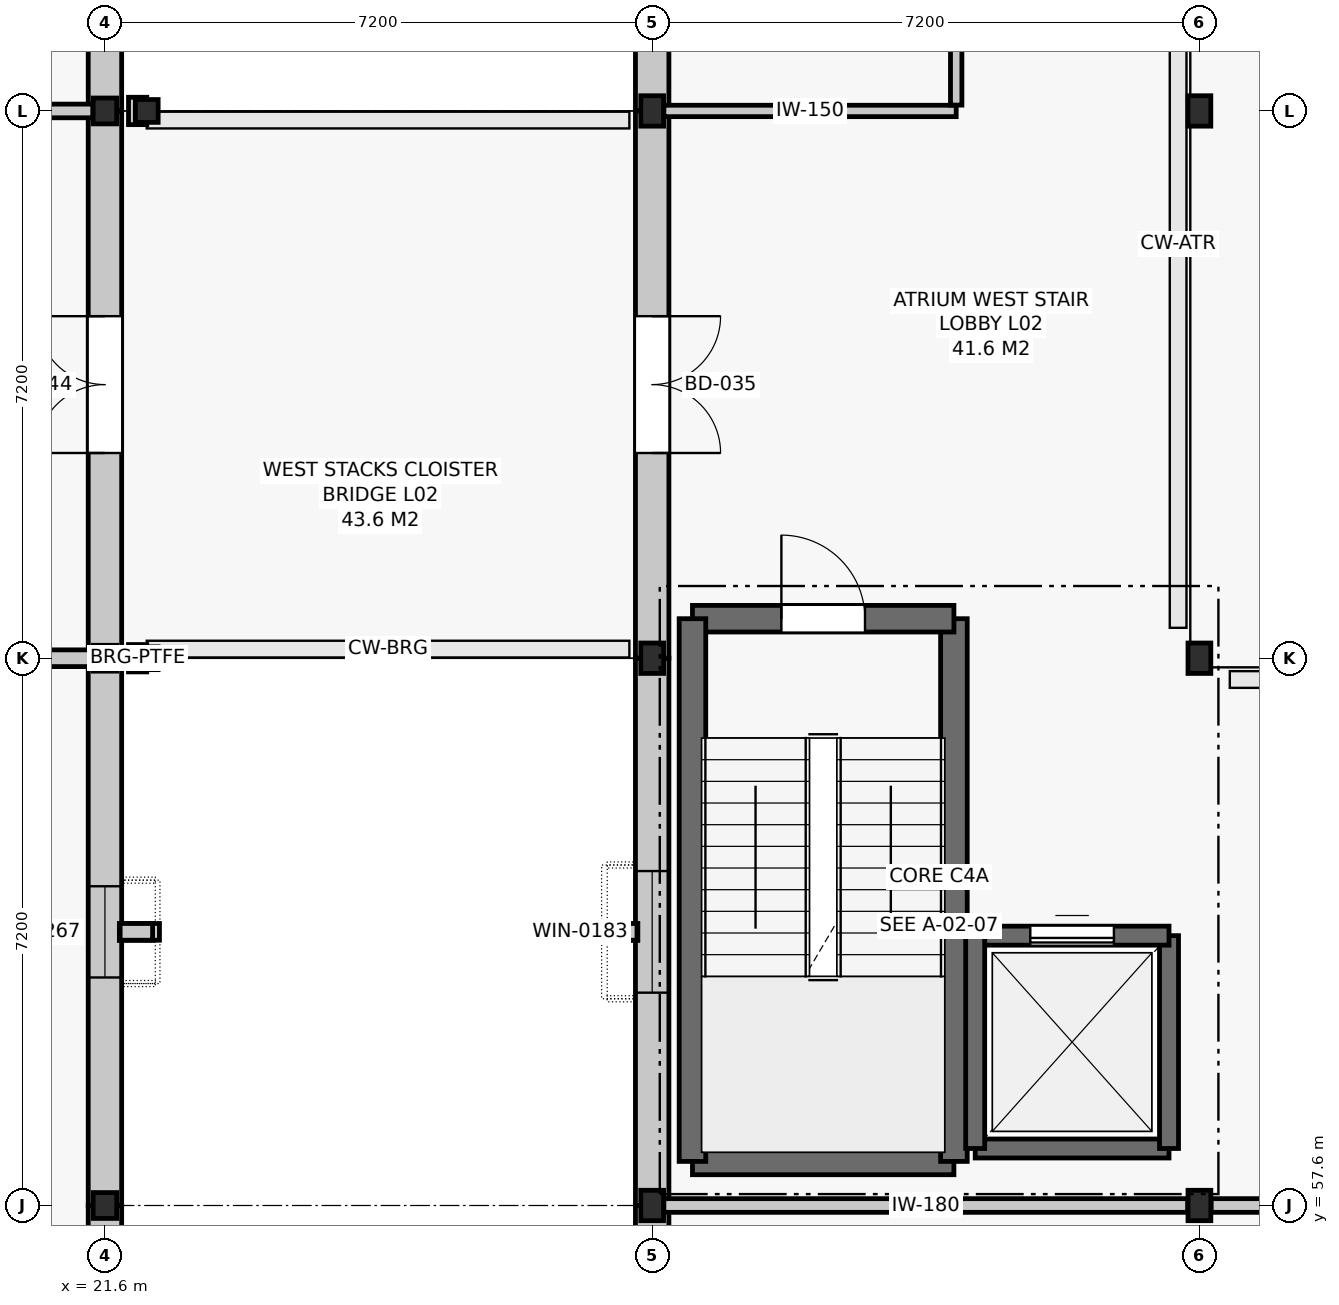
"""IFC4 building model, lengths in metres.
Left out: names, types, materials, properties, quantities, classifications, styles, units other than length and angle.
Written with IfcOpenShell. Run it as: python <this file> out.ifc"""

import sys

from ifc_helpers import new_model, si_unit, direction, frame, frame_2d, origin, origin_2d, place, context, subcontext, project, spatial, rectangle, i_section, extrude, element, fill, save


model = new_model("IFC4")
c1 = context("Model", 3, precision=1e-05, world=origin(), true_north=direction((0.0, 1.0)))
c2 = subcontext(c1, "Body", "Model", "MODEL_VIEW")
j1 = project(units=[si_unit("LENGTHUNIT", "METRE"), si_unit("PLANEANGLEUNIT", "RADIAN")], contexts=[c1])
p1 = place(None, origin())
s1 = spatial("IfcSite", under=j1, at=p1, CompositionType="ELEMENT")
p2 = place(p1, origin())
s2 = spatial("IfcBuilding", under=s1, at=p2, CompositionType="ELEMENT")
p3 = place(p2, frame((0.0, 0.0, 10.2)))
s3 = spatial("IfcBuildingStorey", under=s2, at=p3, CompositionType="ELEMENT", Elevation=10.2)
for number, where, z_axis, x_axis in (
    (1, (28.8, 57.6, 0.0), (0.0, 0.0, 1.0), (1.0, 0.0, 0.0)),
    (2, (28.8, 64.8, 0.0), (0.0, 0.0, 1.0), (1.0, 0.0, 0.0)),
    (3, (28.8, 72.0, 0.0), (0.0, 0.0, 1.0), (1.0, 0.0, 0.0)),
    (4, (36.0, 57.6, 0.0), (0.0, 0.0, 1.0), (1.0, 0.0, 0.0)),
    (5, (36.0, 64.8, 0.0), (0.0, 0.0, 1.0), (1.0, 0.0, 0.0)),
    (6, (36.0, 72.0, 0.0), (0.0, 0.0, 1.0), (1.0, 0.0, 0.0)),
):
    element("IfcColumn", number, at=place(p3, frame(where, z_axis=z_axis, x_axis=x_axis)), inside=s3, PredefinedType="COLUMN", context=c2, shape_type="SweptSolid", body=[
        extrude(i_section(OverallWidth=0.3, OverallDepth=0.4, WebThickness=0.013, FlangeThickness=0.024, FilletRadius=0.027, at=origin_2d()), origin(), (0.0, 0.0, 1.0), 4.2),
    ])
for number, where, z_axis, x_axis in (
    (7, (21.6, 57.6, 0.0), (0.0, 0.0, 1.0), (1.0, 0.0, 0.0)),
    (8, (21.6, 64.8, 0.0), (0.0, 0.0, 1.0), (1.0, 0.0, 0.0)),
    (9, (21.6, 72.0, 0.0), (0.0, 0.0, 1.0), (1.0, 0.0, 0.0)),
):
    element("IfcColumn", number, at=place(p3, frame(where, z_axis=z_axis, x_axis=x_axis)), inside=s3, PredefinedType="COLUMN", context=c2, shape_type="SweptSolid", body=[
        extrude(i_section(OverallWidth=0.31, OverallDepth=0.34, WebThickness=0.021, FlangeThickness=0.035, FilletRadius=0.027, at=origin_2d()), origin(), (0.0, 0.0, 1.0), 4.2),
    ])
for number, where, z_axis, x_axis in (
    (10, (22.15, 64.8, 0.0), (0.0, 0.0, 1.0), (1.0, 0.0, 0.0)),
    (11, (22.15, 72.0, 0.0), (0.0, 0.0, 1.0), (1.0, 0.0, 0.0)),
):
    element("IfcColumn", number, at=place(p3, frame(where, z_axis=z_axis, x_axis=x_axis)), inside=s3, PredefinedType="COLUMN", context=c2, shape_type="SweptSolid", body=[
        extrude(i_section(OverallWidth=0.3, OverallDepth=0.3, WebThickness=0.011, FlangeThickness=0.019, FilletRadius=0.027, at=origin_2d()), origin(), (0.0, 0.0, 1.0), 4.2),
    ])
p4 = place(p3, frame((28.8, 79.2, 0.0), z_axis=(0.0, 0.0, 1.0), x_axis=(0.0, -1.0, 0.0)))
e12 = element("IfcWall", 12, at=p4, inside=s3, PredefinedType="SOLIDWALL", context=c2, shape_type="SweptSolid", body=[
    extrude(rectangle(XDim=7.2, YDim=0.44, at=frame_2d((3.6, 0.0))), origin(), (0.0, 0.0, 1.0), 3.2),
])
p5 = place(p4, frame((2.8, 0.0, 0.92)))
e13 = element("IfcOpeningElement", 13, at=p5, cuts=e12, PredefinedType="OPENING", context=c2, shape_type="SweptSolid", body=[
    extrude(rectangle(XDim=1.6, YDim=2.2, at=frame_2d((0.8, 1.1))), frame((0.0, 0.232, 0.0), z_axis=(0.0, -1.0, 0.0), x_axis=(1.0, 0.0, 0.0)), (0.0, 0.0, 1.0), 0.464),
])
p6 = place(p3, frame((28.8, 72.0, 0.0), z_axis=(0.0, 0.0, 1.0), x_axis=(0.0, -1.0, 0.0)))
e14 = element("IfcWall", 14, at=p6, inside=s3, PredefinedType="SOLIDWALL", context=c2, shape_type="SweptSolid", body=[
    extrude(rectangle(XDim=7.2, YDim=0.44, at=frame_2d((3.6, 0.0))), origin(), (0.0, 0.0, 1.0), 3.2),
])
p7 = place(p6, frame((2.7, 0.0, 0.0)))
e15 = element("IfcOpeningElement", 15, at=p7, cuts=e14, PredefinedType="OPENING", context=c2, shape_type="SweptSolid", body=[
    extrude(rectangle(XDim=1.8, YDim=2.3, at=frame_2d((0.9, 1.15))), frame((0.0, 0.232, 0.0), z_axis=(0.0, -1.0, 0.0), x_axis=(1.0, 0.0, 0.0)), (0.0, 0.0, 1.0), 0.464),
])
p8 = place(p3, frame((28.8, 64.8, 0.0), z_axis=(0.0, 0.0, 1.0), x_axis=(0.0, -1.0, 0.0)))
e16 = element("IfcWall", 16, at=p8, inside=s3, PredefinedType="SOLIDWALL", context=c2, shape_type="SweptSolid", body=[
    extrude(rectangle(XDim=7.2, YDim=0.44, at=frame_2d((3.6, 0.0))), origin(), (0.0, 0.0, 1.0), 3.2),
])
p9 = place(p8, frame((2.8, 0.0, 0.92)))
e17 = element("IfcOpeningElement", 17, at=p9, cuts=e16, PredefinedType="OPENING", context=c2, shape_type="SweptSolid", body=[
    extrude(rectangle(XDim=1.6, YDim=2.2, at=frame_2d((0.8, 1.1))), frame((0.0, 0.232, 0.0), z_axis=(0.0, -1.0, 0.0), x_axis=(1.0, 0.0, 0.0)), (0.0, 0.0, 1.0), 0.464),
])
p10 = place(p3, frame((28.8, 57.6, 0.0), z_axis=(0.0, 0.0, 1.0), x_axis=(0.0, -1.0, 0.0)))
e18 = element("IfcWall", 18, at=p10, inside=s3, PredefinedType="SOLIDWALL", context=c2, shape_type="SweptSolid", body=[
    extrude(rectangle(XDim=6.996, YDim=0.44, at=frame_2d((3.498, 0.0))), origin(), (0.0, 0.0, 1.0), 3.2),
])
p11 = place(p10, frame((2.8, 0.0, 0.92)))
e19 = element("IfcOpeningElement", 19, at=p11, cuts=e18, PredefinedType="OPENING", context=c2, shape_type="SweptSolid", body=[
    extrude(rectangle(XDim=1.6, YDim=2.2, at=frame_2d((0.8, 1.1))), frame((0.0, 0.232, 0.0), z_axis=(0.0, -1.0, 0.0), x_axis=(1.0, 0.0, 0.0)), (0.0, 0.0, 1.0), 0.464),
])
p12 = place(p3, frame((21.6, 50.4, 0.0), z_axis=(0.0, 0.0, 1.0), x_axis=(0.0, 1.0, 0.0)))
e20 = element("IfcWall", 20, at=p12, inside=s3, PredefinedType="SOLIDWALL", context=c2, shape_type="SweptSolid", body=[
    extrude(rectangle(XDim=7.2, YDim=0.44, at=frame_2d((3.6, 0.0))), origin(), (0.0, 0.0, 1.0), 3.18),
])
p13 = place(p12, frame((3.0, 0.0, 0.95)))
e21 = element("IfcOpeningElement", 21, at=p13, cuts=e20, PredefinedType="OPENING", context=c2, shape_type="SweptSolid", body=[
    extrude(rectangle(XDim=1.2, YDim=2.15, at=frame_2d((0.6, 1.075))), frame((0.0, 0.232, 0.0), z_axis=(0.0, -1.0, 0.0), x_axis=(1.0, 0.0, 0.0)), (0.0, 0.0, 1.0), 0.464),
])
p14 = place(p3, frame((21.6, 57.6, 0.0), z_axis=(0.0, 0.0, 1.0), x_axis=(0.0, 1.0, 0.0)))
e22 = element("IfcWall", 22, at=p14, inside=s3, PredefinedType="SOLIDWALL", context=c2, shape_type="SweptSolid", body=[
    extrude(rectangle(XDim=7.2, YDim=0.44, at=frame_2d((3.6, 0.0))), origin(), (0.0, 0.0, 1.0), 3.18),
])
p15 = place(p14, frame((3.0, 0.0, 0.95)))
e23 = element("IfcOpeningElement", 23, at=p15, cuts=e22, PredefinedType="OPENING", context=c2, shape_type="SweptSolid", body=[
    extrude(rectangle(XDim=1.2, YDim=2.15, at=frame_2d((0.6, 1.075))), frame((0.0, 0.232, 0.0), z_axis=(0.0, -1.0, 0.0), x_axis=(1.0, 0.0, 0.0)), (0.0, 0.0, 1.0), 0.464),
])
p16 = place(p3, frame((21.6, 64.8, 0.0), z_axis=(0.0, 0.0, 1.0), x_axis=(0.0, 1.0, 0.0)))
e24 = element("IfcWall", 24, at=p16, inside=s3, PredefinedType="SOLIDWALL", context=c2, shape_type="SweptSolid", body=[
    extrude(rectangle(XDim=7.2, YDim=0.44, at=frame_2d((3.6, 0.0))), origin(), (0.0, 0.0, 1.0), 3.18),
])
p17 = place(p16, frame((2.7, 0.0, 0.0)))
e25 = element("IfcOpeningElement", 25, at=p17, cuts=e24, PredefinedType="OPENING", context=c2, shape_type="SweptSolid", body=[
    extrude(rectangle(XDim=1.8, YDim=2.3, at=frame_2d((0.9, 1.15))), frame((0.0, 0.232, 0.0), z_axis=(0.0, -1.0, 0.0), x_axis=(1.0, 0.0, 0.0)), (0.0, 0.0, 1.0), 0.464),
])
p18 = place(p3, frame((21.6, 72.0, 0.0), z_axis=(0.0, 0.0, 1.0), x_axis=(0.0, 1.0, 0.0)))
e26 = element("IfcWall", 26, at=p18, inside=s3, PredefinedType="SOLIDWALL", context=c2, shape_type="SweptSolid", body=[
    extrude(rectangle(XDim=7.2, YDim=0.44, at=frame_2d((3.6, 0.0))), origin(), (0.0, 0.0, 1.0), 3.18),
])
p19 = place(p18, frame((3.0, 0.0, 0.95)))
e27 = element("IfcOpeningElement", 27, at=p19, cuts=e26, PredefinedType="OPENING", context=c2, shape_type="SweptSolid", body=[
    extrude(rectangle(XDim=1.2, YDim=2.15, at=frame_2d((0.6, 1.075))), frame((0.0, 0.232, 0.0), z_axis=(0.0, -1.0, 0.0), x_axis=(1.0, 0.0, 0.0)), (0.0, 0.0, 1.0), 0.464),
])
p20 = place(p3, frame((29.33, 58.18, 0.0), z_axis=(0.0, 0.0, 1.0), x_axis=(1.0, 0.0, 0.0)))
e28 = element("IfcWall", 28, at=p20, inside=s3, PredefinedType="SHEAR", context=c2, shape_type="SweptSolid", body=[
    extrude(rectangle(XDim=3.44, YDim=0.35, at=frame_2d((1.72, 0.0))), origin(), (0.0, 0.0, 1.0), 3.92),
])
p21 = place(p3, frame((32.77, 58.18, 0.0), z_axis=(0.0, 0.0, 1.0), x_axis=(0.0, 1.0, 0.0)))
e29 = element("IfcWall", 29, at=p21, inside=s3, PredefinedType="SHEAR", context=c2, shape_type="SweptSolid", body=[
    extrude(rectangle(XDim=7.14, YDim=0.35, at=frame_2d((3.57, 0.0))), origin(), (0.0, 0.0, 1.0), 3.92),
])
p22 = place(p3, frame((32.77, 65.32, 0.0), z_axis=(0.0, 0.0, 1.0), x_axis=(-1.0, 0.0, 0.0)))
e30 = element("IfcWall", 30, at=p22, inside=s3, PredefinedType="SHEAR", context=c2, shape_type="SweptSolid", body=[
    extrude(rectangle(XDim=3.44, YDim=0.35, at=frame_2d((1.72, 0.0))), origin(), (0.0, 0.0, 1.0), 3.92),
])
p23 = place(p22, frame((1.17, 0.0, 0.0)))
e31 = element("IfcOpeningElement", 31, at=p23, cuts=e30, PredefinedType="OPENING", context=c2, shape_type="SweptSolid", body=[
    extrude(rectangle(XDim=1.1, YDim=2.15, at=frame_2d((0.55, 1.075))), frame((0.0, 0.187, 0.0), z_axis=(0.0, -1.0, 0.0), x_axis=(1.0, 0.0, 0.0)), (0.0, 0.0, 1.0), 0.374),
])
p24 = place(p3, frame((29.33, 65.32, 0.0), z_axis=(0.0, 0.0, 1.0), x_axis=(0.0, -1.0, 0.0)))
e32 = element("IfcWall", 32, at=p24, inside=s3, PredefinedType="SHEAR", context=c2, shape_type="SweptSolid", body=[
    extrude(rectangle(XDim=7.14, YDim=0.35, at=frame_2d((3.57, 0.0))), origin(), (0.0, 0.0, 1.0), 3.92),
])
p25 = place(p3, frame((33.05, 58.35, 0.0), z_axis=(0.0, 0.0, 1.0), x_axis=(1.0, 0.0, 0.0)))
e33 = element("IfcWall", 33, at=p25, inside=s3, PredefinedType="SHEAR", context=c2, shape_type="SweptSolid", body=[
    extrude(rectangle(XDim=2.55, YDim=0.25, at=frame_2d((1.275, 0.0))), origin(), (0.0, 0.0, 1.0), 3.92),
])
p26 = place(p3, frame((35.6, 58.35, 0.0), z_axis=(0.0, 0.0, 1.0), x_axis=(0.0, 1.0, 0.0)))
e34 = element("IfcWall", 34, at=p26, inside=s3, PredefinedType="SHEAR", context=c2, shape_type="SweptSolid", body=[
    extrude(rectangle(XDim=2.8, YDim=0.25, at=frame_2d((1.4, 0.0))), origin(), (0.0, 0.0, 1.0), 3.92),
])
p27 = place(p3, frame((35.6, 61.15, 0.0), z_axis=(0.0, 0.0, 1.0), x_axis=(-1.0, 0.0, 0.0)))
e35 = element("IfcWall", 35, at=p27, inside=s3, PredefinedType="SHEAR", context=c2, shape_type="SweptSolid", body=[
    extrude(rectangle(XDim=2.55, YDim=0.25, at=frame_2d((1.275, 0.0))), origin(), (0.0, 0.0, 1.0), 3.92),
])
p28 = place(p27, frame((0.725, 0.0, 0.0)))
e36 = element("IfcOpeningElement", 36, at=p28, cuts=e35, PredefinedType="OPENING", context=c2, shape_type="SweptSolid", body=[
    extrude(rectangle(XDim=1.1, YDim=2.1, at=frame_2d((0.55, 1.05))), frame((0.0, 0.137, 0.0), z_axis=(0.0, -1.0, 0.0), x_axis=(1.0, 0.0, 0.0)), (0.0, 0.0, 1.0), 0.274),
])
p29 = place(p3, frame((33.05, 61.15, 0.0), z_axis=(0.0, 0.0, 1.0), x_axis=(0.0, -1.0, 0.0)))
e37 = element("IfcWall", 37, at=p29, inside=s3, PredefinedType="SHEAR", context=c2, shape_type="SweptSolid", body=[
    extrude(rectangle(XDim=2.8, YDim=0.25, at=frame_2d((1.4, 0.0))), origin(), (0.0, 0.0, 1.0), 3.92),
])
p30 = place(p3, frame((28.954, 72.0, 0.0), z_axis=(0.0, 0.0, 1.0), x_axis=(1.0, 0.0, 0.0)))
e38 = element("IfcWall", 38, at=p30, inside=s3, PredefinedType="PARTITIONING", context=c2, shape_type="SweptSolid", body=[
    extrude(rectangle(XDim=3.846, YDim=0.15, at=frame_2d((1.923, 0.0))), origin(), (0.0, 0.0, 1.0), 3.595),
])
for number, where, z_axis, x_axis in (
    (39, (28.954, 57.6, 0.0), (0.0, 0.0, 1.0), (1.0, 0.0, 0.0)),
    (40, (36.154, 57.6, 0.0), (0.0, 0.0, 1.0), (1.0, 0.0, 0.0)),
):
    element("IfcWall", number, at=place(p3, frame(where, z_axis=z_axis, x_axis=x_axis)), inside=s3, PredefinedType="PARTITIONING", context=c2, shape_type="SweptSolid", body=[
        extrude(rectangle(XDim=6.892, YDim=0.18, at=frame_2d((3.446, 0.0))), origin(), (0.0, 0.0, 1.0), 3.535),
    ])
p31 = place(p3, frame((14.559, 64.8, 0.0), z_axis=(0.0, 0.0, 1.0), x_axis=(1.0, 0.0, 0.0)))
e41 = element("IfcWall", 41, at=p31, inside=s3, PredefinedType="SOLIDWALL", context=c2, shape_type="SweptSolid", body=[
    extrude(rectangle(XDim=6.882, YDim=0.22, at=frame_2d((3.441, 0.0))), origin(), (0.0, 0.0, 1.0), 3.285),
])
p32 = place(p31, frame((2.841, 0.0, 0.0)))
e42 = element("IfcOpeningElement", 42, at=p32, cuts=e41, PredefinedType="OPENING", context=c2, shape_type="SweptSolid", body=[
    extrude(rectangle(XDim=1.2, YDim=2.2, at=frame_2d((0.6, 1.1))), frame((0.0, 0.122, 0.0), z_axis=(0.0, -1.0, 0.0), x_axis=(1.0, 0.0, 0.0)), (0.0, 0.0, 1.0), 0.244),
])
p33 = place(p3, frame((14.559, 72.0, 0.0), z_axis=(0.0, 0.0, 1.0), x_axis=(1.0, 0.0, 0.0)))
e43 = element("IfcWall", 43, at=p33, inside=s3, PredefinedType="PARTITIONING", context=c2, shape_type="SweptSolid", body=[
    extrude(rectangle(XDim=6.882, YDim=0.18, at=frame_2d((3.441, 0.0))), origin(), (0.0, 0.0, 1.0), 3.285),
])
p34 = place(p3, frame((32.8, 72.077, 0.0), z_axis=(0.0, 0.0, 1.0), x_axis=(0.0, 1.0, 0.0)))
e44 = element("IfcWall", 44, at=p34, inside=s3, PredefinedType="PARTITIONING", context=c2, shape_type="SweptSolid", body=[
    extrude(rectangle(XDim=6.046, YDim=0.15, at=frame_2d((3.023, 0.0))), origin(), (0.0, 0.0, 1.0), 3.595),
])
p35 = place(p34, frame((2.533, 0.0, 0.0)))
e45 = element("IfcOpeningElement", 45, at=p35, cuts=e44, PredefinedType="OPENING", context=c2, shape_type="SweptSolid", body=[
    extrude(rectangle(XDim=0.98, YDim=2.1, at=frame_2d((0.49, 1.05))), frame((0.0, 0.087, 0.0), z_axis=(0.0, -1.0, 0.0), x_axis=(1.0, 0.0, 0.0)), (0.0, 0.0, 1.0), 0.174),
])
p36 = place(p7, origin())
e46 = element("IfcDoor", 46, at=p36, inside=s3, OperationType="DOUBLE_DOOR_SINGLE_SWING", PredefinedType="DOOR", context=c2, shape_type="SweptSolid", body=[
    extrude(rectangle(XDim=1.8, YDim=2.3, at=frame_2d((0.9, 1.15))), frame((0.0, 0.025, 0.0), z_axis=(0.0, -1.0, 0.0), x_axis=(1.0, 0.0, 0.0)), (0.0, 0.0, 1.0), 0.05),
])
fill(e15, e46)
p37 = place(p9, origin())
e47 = element("IfcWindow", 47, at=p37, inside=s3, PartitioningType="SINGLE_PANEL", PredefinedType="WINDOW", context=c2, shape_type="SweptSolid", body=[
    extrude(rectangle(XDim=1.6, YDim=2.2, at=frame_2d((0.8, 1.1))), frame((0.0, 0.03, 0.0), z_axis=(0.0, -1.0, 0.0), x_axis=(1.0, 0.0, 0.0)), (0.0, 0.0, 1.0), 0.06),
])
fill(e17, e47)
p38 = place(p15, origin())
e48 = element("IfcWindow", 48, at=p38, inside=s3, PartitioningType="SINGLE_PANEL", PredefinedType="WINDOW", context=c2, shape_type="SweptSolid", body=[
    extrude(rectangle(XDim=1.2, YDim=2.15, at=frame_2d((0.6, 1.075))), frame((0.0, 0.03, 0.0), z_axis=(0.0, -1.0, 0.0), x_axis=(1.0, 0.0, 0.0)), (0.0, 0.0, 1.0), 0.06),
])
fill(e23, e48)
p39 = place(p17, origin())
e49 = element("IfcDoor", 49, at=p39, inside=s3, OperationType="DOUBLE_DOOR_SINGLE_SWING", PredefinedType="DOOR", context=c2, shape_type="SweptSolid", body=[
    extrude(rectangle(XDim=1.8, YDim=2.3, at=frame_2d((0.9, 1.15))), frame((0.0, 0.025, 0.0), z_axis=(0.0, -1.0, 0.0), x_axis=(1.0, 0.0, 0.0)), (0.0, 0.0, 1.0), 0.05),
])
fill(e25, e49)
p40 = place(p23, frame((1.1, 0.0, 0.0), z_axis=(0.0, 0.0, 1.0), x_axis=(-1.0, 0.0, 0.0)))
e50 = element("IfcDoor", 50, at=p40, inside=s3, OperationType="SINGLE_SWING_LEFT", PredefinedType="DOOR", context=c2, shape_type="SweptSolid", body=[
    extrude(rectangle(XDim=1.1, YDim=2.15, at=frame_2d((0.55, 1.075))), frame((0.0, 0.025, 0.0), z_axis=(0.0, -1.0, 0.0), x_axis=(1.0, 0.0, 0.0)), (0.0, 0.0, 1.0), 0.05),
])
fill(e31, e50)
p41 = place(p28, origin())
e51 = element("IfcDoor", 51, at=p41, inside=s3, OperationType="SLIDING_TO_LEFT", PredefinedType="DOOR", context=c2, shape_type="SweptSolid", body=[
    extrude(rectangle(XDim=1.1, YDim=2.1, at=frame_2d((0.55, 1.05))), frame((0.0, 0.025, 0.0), z_axis=(0.0, -1.0, 0.0), x_axis=(1.0, 0.0, 0.0)), (0.0, 0.0, 1.0), 0.05),
])
fill(e36, e51)
save(model, sys.argv[1])
